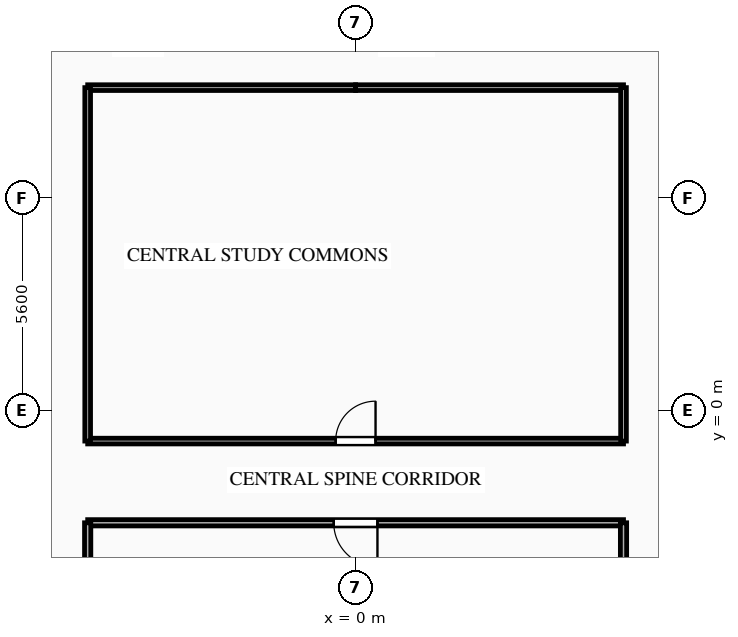
"""IFC4 building model, lengths in metres.
Left out: names, types, materials, properties, quantities, classifications, styles, units other than length and angle.
Written with IfcOpenShell. Run it as: python <this file> out.ifc"""

import sys

from ifc_helpers import new_model, si_unit, direction, frame, frame_2d, origin, place, context, subcontext, project, spatial, rectangle, extrude, element, fill, save


model = new_model("IFC4")
c1 = context("Model", 3, precision=1e-05, world=origin(), true_north=direction((0.0, 1.0)))
c2 = subcontext(c1, "Body", "Model", "MODEL_VIEW")
j1 = project(units=[si_unit("LENGTHUNIT", "METRE"), si_unit("PLANEANGLEUNIT", "RADIAN")], contexts=[c1])
p1 = place(None, origin())
s1 = spatial("IfcSite", under=j1, at=p1, CompositionType="ELEMENT")
p2 = place(p1, origin())
s2 = spatial("IfcBuilding", under=s1, at=p2, CompositionType="ELEMENT")
p3 = place(p2, frame((0.0, 0.0, 131.0)))
s3 = spatial("IfcBuildingStorey", under=s2, at=p3, CompositionType="ELEMENT", Elevation=131.0)
for number, where, z_axis, x_axis in (
    (1, (0.0, 8.5, 0.0), (0.0, 0.0, 1.0), (-1.0, 0.0, 0.0)),
    (2, (7.05, 8.5, 0.0), (0.0, 0.0, 1.0), (-1.0, 0.0, 0.0)),
):
    element("IfcWall", number, at=place(p3, frame(where, z_axis=z_axis, x_axis=x_axis)), inside=s3, PredefinedType="PARTITIONING", context=c2, shape_type="SweptSolid", body=[
        extrude(rectangle(XDim=7.05, YDim=0.15, at=frame_2d((3.525, 0.0))), origin(), (0.0, 0.0, 1.0), 3.04),
    ])
p4 = place(p3, frame((-7.05, -0.8, 0.0), z_axis=(0.0, 0.0, 1.0), x_axis=(1.0, 0.0, 0.0)))
e3 = element("IfcWall", 3, at=p4, inside=s3, PredefinedType="PARTITIONING", context=c2, shape_type="SweptSolid", body=[
    extrude(rectangle(XDim=14.1, YDim=0.15, at=frame_2d((7.05, 0.0))), origin(), (0.0, 0.0, 1.0), 3.04),
])
p5 = place(p4, frame((6.525, 0.0, 0.0)))
e4 = element("IfcOpeningElement", 4, at=p5, cuts=e3, PredefinedType="OPENING", context=c2, shape_type="SweptSolid", body=[
    extrude(rectangle(XDim=1.05, YDim=2.15, at=frame_2d((0.525, 1.075))), frame((0.0, 0.085, 0.0), z_axis=(0.0, -1.0, 0.0), x_axis=(1.0, 0.0, 0.0)), (0.0, 0.0, 1.0), 0.17),
])
p6 = place(p3, frame((7.05, -2.95, 0.0), z_axis=(0.0, 0.0, 1.0), x_axis=(-1.0, 0.0, 0.0)))
e5 = element("IfcWall", 5, at=p6, inside=s3, PredefinedType="PARTITIONING", context=c2, shape_type="SweptSolid", body=[
    extrude(rectangle(XDim=14.1, YDim=0.165, at=frame_2d((7.05, 0.0))), origin(), (0.0, 0.0, 1.0), 3.04),
])
p7 = place(p6, frame((6.475, 0.0, 0.0)))
e6 = element("IfcOpeningElement", 6, at=p7, cuts=e5, PredefinedType="OPENING", context=c2, shape_type="SweptSolid", body=[
    extrude(rectangle(XDim=1.15, YDim=2.15, at=frame_2d((0.575, 1.075))), frame((0.0, 0.093, 0.0), z_axis=(0.0, -1.0, 0.0), x_axis=(1.0, 0.0, 0.0)), (0.0, 0.0, 1.0), 0.185),
])
p8 = place(p3, frame((-7.05, 8.5, 0.0), z_axis=(0.0, 0.0, 1.0), x_axis=(0.0, -1.0, 0.0)))
e7 = element("IfcWall", 7, at=p8, inside=s3, PredefinedType="PARTITIONING", context=c2, shape_type="SweptSolid", body=[
    extrude(rectangle(XDim=9.3, YDim=0.15, at=frame_2d((4.65, 0.0))), origin(), (0.0, 0.0, 1.0), 3.04),
])
p9 = place(p3, frame((-7.05, -2.95, 0.0), z_axis=(0.0, 0.0, 1.0), x_axis=(0.0, -1.0, 0.0)))
e8 = element("IfcWall", 8, at=p9, inside=s3, PredefinedType="PARTITIONING", context=c2, shape_type="SweptSolid", body=[
    extrude(rectangle(XDim=2.65, YDim=0.165, at=frame_2d((1.325, 0.0))), origin(), (0.0, 0.0, 1.0), 3.04),
])
p10 = place(p3, frame((7.05, -0.8, 0.0), z_axis=(0.0, 0.0, 1.0), x_axis=(0.0, 1.0, 0.0)))
e9 = element("IfcWall", 9, at=p10, inside=s3, PredefinedType="PARTITIONING", context=c2, shape_type="SweptSolid", body=[
    extrude(rectangle(XDim=9.3, YDim=0.15, at=frame_2d((4.65, 0.0))), origin(), (0.0, 0.0, 1.0), 3.04),
])
p11 = place(p3, frame((7.05, -5.6, 0.0), z_axis=(0.0, 0.0, 1.0), x_axis=(0.0, 1.0, 0.0)))
e10 = element("IfcWall", 10, at=p11, inside=s3, PredefinedType="PARTITIONING", context=c2, shape_type="SweptSolid", body=[
    extrude(rectangle(XDim=2.65, YDim=0.165, at=frame_2d((1.325, 0.0))), origin(), (0.0, 0.0, 1.0), 3.04),
])
p12 = place(p5, origin())
e11 = element("IfcDoor", 11, at=p12, inside=s3, OperationType="SINGLE_SWING_RIGHT", PredefinedType="DOOR", context=c2, shape_type="SweptSolid", body=[
    extrude(rectangle(XDim=1.05, YDim=2.15, at=frame_2d((0.525, 1.075))), frame((0.0, 0.025, 0.0), z_axis=(0.0, -1.0, 0.0), x_axis=(1.0, 0.0, 0.0)), (0.0, 0.0, 1.0), 0.05),
])
fill(e4, e11)
p13 = place(p7, origin())
e12 = element("IfcDoor", 12, at=p13, inside=s3, OperationType="SINGLE_SWING_LEFT", PredefinedType="DOOR", context=c2, shape_type="SweptSolid", body=[
    extrude(rectangle(XDim=1.15, YDim=2.15, at=frame_2d((0.575, 1.075))), frame((0.0, 0.025, 0.0), z_axis=(0.0, -1.0, 0.0), x_axis=(1.0, 0.0, 0.0)), (0.0, 0.0, 1.0), 0.05),
])
fill(e6, e12)
save(model, sys.argv[1])
